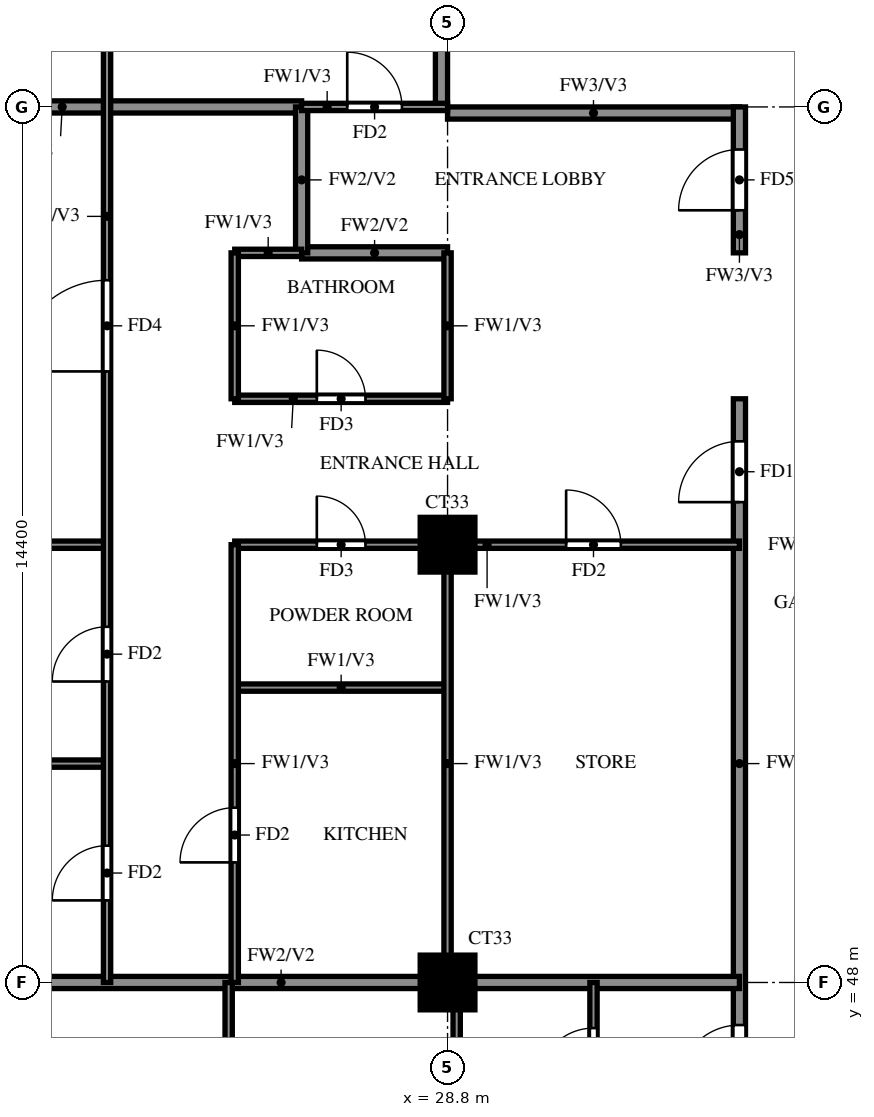
"""IFC4 building model, lengths in metres.
Left out: names, types, materials, properties, quantities, classifications, styles, units other than length and angle.
Written with IfcOpenShell. Run it as: python <this file> out.ifc"""

import sys

from ifc_helpers import new_model, si_unit, direction, frame, frame_2d, origin, origin_2d, place, context, subcontext, project, spatial, rectangle, extrude, source, transform, mapped, element, fill, save


model = new_model("IFC4")
c1 = context("Model", 3, precision=1e-05, world=origin(), true_north=direction((0.0, 1.0)))
c2 = subcontext(c1, "Body", "Model", "MODEL_VIEW")
j1 = project(units=[si_unit("LENGTHUNIT", "METRE"), si_unit("PLANEANGLEUNIT", "RADIAN")], contexts=[c1])
p1 = place(None, origin())
s1 = spatial("IfcSite", under=j1, at=p1, CompositionType="ELEMENT")
p2 = place(p1, origin())
s2 = spatial("IfcBuilding", under=s1, at=p2, CompositionType="ELEMENT")
p3 = place(p2, frame((0.0, 0.0, 225.5)))
s3 = spatial("IfcBuildingStorey", under=s2, at=p3, CompositionType="ELEMENT", Elevation=225.5)
m1 = source(origin(), c2, "Body", "SweptSolid", [
    extrude(rectangle(XDim=0.9, YDim=0.9, at=origin_2d()), origin(), (0.0, 0.0, 1.0), 3.22),
])
for number, where, z_axis, x_axis in (
    (1, (28.8, 48.0, 0.0), (0.0, 0.0, 1.0), (1.0, 0.0, 0.0)),
    (2, (28.8, 55.2, 0.0), (0.0, 0.0, 1.0), (1.0, 0.0, 0.0)),
):
    element("IfcColumn", number, at=place(p3, frame(where, z_axis=z_axis, x_axis=x_axis)), inside=s3, PredefinedType="COLUMN", context=c2, shape_type="MappedRepresentation", body=[
        mapped(m1, transform((0.0, 0.0, 0.0))),
    ])
p4 = place(p3, frame((28.8, 62.3, 0.0), z_axis=(0.0, 0.0, 1.0), x_axis=(1.0, 0.0, 0.0)))
e3 = element("IfcWall", 3, at=p4, inside=s3, PredefinedType="SOLIDWALL", context=c2, shape_type="SweptSolid", body=[
    extrude(rectangle(XDim=4.8, YDim=0.2, at=frame_2d((2.4, 0.0))), origin(), (0.0, 0.0, 1.0), 3.22),
])
p5 = place(p3, frame((28.7, 62.4, 0.0), z_axis=(0.0, 0.0, 1.0), x_axis=(0.0, 1.0, 0.0)))
e4 = element("IfcWall", 4, at=p5, inside=s3, PredefinedType="SOLIDWALL", context=c2, shape_type="SweptSolid", body=[
    extrude(rectangle(XDim=15.6, YDim=0.2, at=frame_2d((7.8, 0.0))), origin(), (0.0, 0.0, 1.0), 3.22),
])
p6 = place(p3, frame((33.6, 45.6, 0.0), z_axis=(0.0, 0.0, 1.0), x_axis=(0.0, 1.0, 0.0)))
e5 = element("IfcWall", 5, at=p6, inside=s3, PredefinedType="SOLIDWALL", context=c2, shape_type="SweptSolid", body=[
    extrude(rectangle(XDim=12.0, YDim=0.2, at=frame_2d((6.0, 0.0))), origin(), (0.0, 0.0, 1.0), 3.22),
])
p7 = place(p6, frame((0.7, 0.0, 0.0)))
e6 = element("IfcOpeningElement", 6, at=p7, cuts=e5, PredefinedType="OPENING", context=c2, shape_type="SweptSolid", body=[
    extrude(rectangle(XDim=1.0, YDim=2.1, at=frame_2d((0.5, 1.05))), frame((0.0, 0.11, 0.0), z_axis=(0.0, -1.0, 0.0), x_axis=(1.0, 0.0, 0.0)), (0.0, 0.0, 1.0), 0.22),
])
p8 = place(p6, frame((10.3, 0.0, 0.0)))
e7 = element("IfcOpeningElement", 7, at=p8, cuts=e5, PredefinedType="OPENING", context=c2, shape_type="SweptSolid", body=[
    extrude(rectangle(XDim=1.0, YDim=2.1, at=frame_2d((0.5, 1.05))), frame((0.0, 0.11, 0.0), z_axis=(0.0, -1.0, 0.0), x_axis=(1.0, 0.0, 0.0)), (0.0, 0.0, 1.0), 0.22),
])
p9 = place(p3, frame((33.6, 60.0, 0.0), z_axis=(0.0, 0.0, 1.0), x_axis=(0.0, 1.0, 0.0)))
e8 = element("IfcWall", 8, at=p9, inside=s3, PredefinedType="SOLIDWALL", context=c2, shape_type="SweptSolid", body=[
    extrude(rectangle(XDim=2.4, YDim=0.2, at=frame_2d((1.2, 0.0))), origin(), (0.0, 0.0, 1.0), 3.22),
])
p10 = place(p9, frame((0.7, 0.0, 0.0)))
e9 = element("IfcOpeningElement", 9, at=p10, cuts=e8, PredefinedType="OPENING", context=c2, shape_type="SweptSolid", body=[
    extrude(rectangle(XDim=1.0, YDim=2.1, at=frame_2d((0.5, 1.05))), frame((0.0, 0.11, 0.0), z_axis=(0.0, -1.0, 0.0), x_axis=(1.0, 0.0, 0.0)), (0.0, 0.0, 1.0), 0.22),
])
p11 = place(p3, frame((18.525, 48.0, 0.0), z_axis=(0.0, 0.0, 1.0), x_axis=(1.0, 0.0, 0.0)))
e10 = element("IfcWall", 10, at=p11, inside=s3, PredefinedType="SOLIDWALL", context=c2, shape_type="SweptSolid", body=[
    extrude(rectangle(XDim=15.075, YDim=0.2, at=frame_2d((7.538, 0.0))), origin(), (0.0, 0.0, 1.0), 3.22),
])
p12 = place(p3, frame((26.4, 60.0, 0.0), z_axis=(0.0, 0.0, 1.0), x_axis=(1.0, 0.0, 0.0)))
e11 = element("IfcWall", 11, at=p12, inside=s3, PredefinedType="SOLIDWALL", context=c2, shape_type="SweptSolid", body=[
    extrude(rectangle(XDim=2.4, YDim=0.2, at=frame_2d((1.2, 0.0))), origin(), (0.0, 0.0, 1.0), 3.22),
])
p13 = place(p3, frame((18.525, 62.4, 0.0), z_axis=(0.0, 0.0, 1.0), x_axis=(1.0, 0.0, 0.0)))
e12 = element("IfcWall", 12, at=p13, inside=s3, PredefinedType="SOLIDWALL", context=c2, shape_type="SweptSolid", body=[
    extrude(rectangle(XDim=7.875, YDim=0.2, at=frame_2d((3.938, 0.0))), origin(), (0.0, 0.0, 1.0), 3.22),
])
p14 = place(p3, frame((26.4, 60.0, 0.0), z_axis=(0.0, 0.0, 1.0), x_axis=(0.0, 1.0, 0.0)))
e13 = element("IfcWall", 13, at=p14, inside=s3, PredefinedType="SOLIDWALL", context=c2, shape_type="SweptSolid", body=[
    extrude(rectangle(XDim=2.4, YDim=0.2, at=frame_2d((1.2, 0.0))), origin(), (0.0, 0.0, 1.0), 3.22),
])
p15 = place(p3, frame((18.525, 51.6, 0.0), z_axis=(0.0, 0.0, 1.0), x_axis=(1.0, 0.0, 0.0)))
e14 = element("IfcWall", 14, at=p15, inside=s3, PredefinedType="PARTITIONING", context=c2, shape_type="SweptSolid", body=[
    extrude(rectangle(XDim=4.675, YDim=0.12, at=frame_2d((2.337, 0.0))), origin(), (0.0, 0.0, 1.0), 2.32),
])
p16 = place(p3, frame((25.3, 52.85, 0.0), z_axis=(0.0, 0.0, 1.0), x_axis=(1.0, 0.0, 0.0)))
e15 = element("IfcWall", 15, at=p16, inside=s3, PredefinedType="PARTITIONING", context=c2, shape_type="SweptSolid", body=[
    extrude(rectangle(XDim=3.5, YDim=0.12, at=frame_2d((1.75, 0.0))), origin(), (0.0, 0.0, 1.0), 3.22),
])
p17 = place(p3, frame((18.525, 55.2, 0.0), z_axis=(0.0, 0.0, 1.0), x_axis=(1.0, 0.0, 0.0)))
e16 = element("IfcWall", 16, at=p17, inside=s3, PredefinedType="PARTITIONING", context=c2, shape_type="SweptSolid", body=[
    extrude(rectangle(XDim=4.675, YDim=0.12, at=frame_2d((2.337, 0.0))), origin(), (0.0, 0.0, 1.0), 3.22),
])
p18 = place(p3, frame((25.3, 55.2, 0.0), z_axis=(0.0, 0.0, 1.0), x_axis=(1.0, 0.0, 0.0)))
e17 = element("IfcWall", 17, at=p18, inside=s3, PredefinedType="PARTITIONING", context=c2, shape_type="SweptSolid", body=[
    extrude(rectangle(XDim=8.3, YDim=0.12, at=frame_2d((4.15, 0.0))), origin(), (0.0, 0.0, 1.0), 3.22),
])
p19 = place(p18, frame((1.35, 0.0, 0.0)))
e18 = element("IfcOpeningElement", 18, at=p19, cuts=e17, PredefinedType="OPENING", context=c2, shape_type="SweptSolid", body=[
    extrude(rectangle(XDim=0.8, YDim=2.1, at=frame_2d((0.4, 1.05))), frame((0.0, 0.07, 0.0), z_axis=(0.0, -1.0, 0.0), x_axis=(1.0, 0.0, 0.0)), (0.0, 0.0, 1.0), 0.14),
])
p20 = place(p18, frame((5.45, 0.0, 0.0)))
e19 = element("IfcOpeningElement", 19, at=p20, cuts=e17, PredefinedType="OPENING", context=c2, shape_type="SweptSolid", body=[
    extrude(rectangle(XDim=0.9, YDim=2.1, at=frame_2d((0.45, 1.05))), frame((0.0, 0.07, 0.0), z_axis=(0.0, -1.0, 0.0), x_axis=(1.0, 0.0, 0.0)), (0.0, 0.0, 1.0), 0.14),
])
p21 = place(p3, frame((25.3, 57.6, 0.0), z_axis=(0.0, 0.0, 1.0), x_axis=(1.0, 0.0, 0.0)))
e20 = element("IfcWall", 20, at=p21, inside=s3, PredefinedType="PARTITIONING", context=c2, shape_type="SweptSolid", body=[
    extrude(rectangle(XDim=3.5, YDim=0.12, at=frame_2d((1.75, 0.0))), origin(), (0.0, 0.0, 1.0), 3.22),
])
p22 = place(p21, frame((1.35, 0.0, 0.0)))
e21 = element("IfcOpeningElement", 21, at=p22, cuts=e20, PredefinedType="OPENING", context=c2, shape_type="SweptSolid", body=[
    extrude(rectangle(XDim=0.8, YDim=2.1, at=frame_2d((0.4, 1.05))), frame((0.0, 0.07, 0.0), z_axis=(0.0, -1.0, 0.0), x_axis=(1.0, 0.0, 0.0)), (0.0, 0.0, 1.0), 0.14),
])
p23 = place(p3, frame((25.3, 60.0, 0.0), z_axis=(0.0, 0.0, 1.0), x_axis=(1.0, 0.0, 0.0)))
e22 = element("IfcWall", 22, at=p23, inside=s3, PredefinedType="PARTITIONING", context=c2, shape_type="SweptSolid", body=[
    extrude(rectangle(XDim=1.1, YDim=0.12, at=frame_2d((0.55, 0.0))), origin(), (0.0, 0.0, 1.0), 3.22),
])
p24 = place(p3, frame((26.4, 62.4, 0.0), z_axis=(0.0, 0.0, 1.0), x_axis=(1.0, 0.0, 0.0)))
e23 = element("IfcWall", 23, at=p24, inside=s3, PredefinedType="PARTITIONING", context=c2, shape_type="SweptSolid", body=[
    extrude(rectangle(XDim=2.4, YDim=0.12, at=frame_2d((1.2, 0.0))), origin(), (0.0, 0.0, 1.0), 3.22),
])
p25 = place(p24, frame((0.75, 0.0, 0.0)))
e24 = element("IfcOpeningElement", 24, at=p25, cuts=e23, PredefinedType="OPENING", context=c2, shape_type="SweptSolid", body=[
    extrude(rectangle(XDim=0.9, YDim=2.1, at=frame_2d((0.45, 1.05))), frame((0.0, 0.07, 0.0), z_axis=(0.0, -1.0, 0.0), x_axis=(1.0, 0.0, 0.0)), (0.0, 0.0, 1.0), 0.14),
])
p26 = place(p3, frame((23.2, 48.0, 0.0), z_axis=(0.0, 0.0, 1.0), x_axis=(0.0, 1.0, 0.0)))
e25 = element("IfcWall", 25, at=p26, inside=s3, PredefinedType="PARTITIONING", context=c2, shape_type="SweptSolid", body=[
    extrude(rectangle(XDim=25.2, YDim=0.12, at=frame_2d((12.6, 0.0))), origin(), (0.0, 0.0, 1.0), 3.22),
])
p27 = place(p26, frame((1.35, 0.0, 0.0)))
e26 = element("IfcOpeningElement", 26, at=p27, cuts=e25, PredefinedType="OPENING", context=c2, shape_type="SweptSolid", body=[
    extrude(rectangle(XDim=0.9, YDim=2.1, at=frame_2d((0.45, 1.05))), frame((0.0, 0.07, 0.0), z_axis=(0.0, -1.0, 0.0), x_axis=(1.0, 0.0, 0.0)), (0.0, 0.0, 1.0), 0.14),
])
p28 = place(p26, frame((4.95, 0.0, 0.0)))
e27 = element("IfcOpeningElement", 27, at=p28, cuts=e25, PredefinedType="OPENING", context=c2, shape_type="SweptSolid", body=[
    extrude(rectangle(XDim=0.9, YDim=2.1, at=frame_2d((0.45, 1.05))), frame((0.0, 0.07, 0.0), z_axis=(0.0, -1.0, 0.0), x_axis=(1.0, 0.0, 0.0)), (0.0, 0.0, 1.0), 0.14),
])
p29 = place(p26, frame((10.05, 0.0, 0.0)))
e28 = element("IfcOpeningElement", 28, at=p29, cuts=e25, PredefinedType="OPENING", context=c2, shape_type="SweptSolid", body=[
    extrude(rectangle(XDim=1.5, YDim=2.1, at=frame_2d((0.75, 1.05))), frame((0.0, 0.07, 0.0), z_axis=(0.0, -1.0, 0.0), x_axis=(1.0, 0.0, 0.0)), (0.0, 0.0, 1.0), 0.14),
])
p30 = place(p26, frame((15.75, 0.0, 0.0)))
e29 = element("IfcOpeningElement", 29, at=p30, cuts=e25, PredefinedType="OPENING", context=c2, shape_type="SweptSolid", body=[
    extrude(rectangle(XDim=0.9, YDim=2.1, at=frame_2d((0.45, 1.05))), frame((0.0, 0.07, 0.0), z_axis=(0.0, -1.0, 0.0), x_axis=(1.0, 0.0, 0.0)), (0.0, 0.0, 1.0), 0.14),
])
p31 = place(p26, frame((19.35, 0.0, 0.0)))
e30 = element("IfcOpeningElement", 30, at=p31, cuts=e25, PredefinedType="OPENING", context=c2, shape_type="SweptSolid", body=[
    extrude(rectangle(XDim=0.9, YDim=2.1, at=frame_2d((0.45, 1.05))), frame((0.0, 0.07, 0.0), z_axis=(0.0, -1.0, 0.0), x_axis=(1.0, 0.0, 0.0)), (0.0, 0.0, 1.0), 0.14),
])
p32 = place(p26, frame((22.95, 0.0, 0.0)))
e31 = element("IfcOpeningElement", 31, at=p32, cuts=e25, PredefinedType="OPENING", context=c2, shape_type="SweptSolid", body=[
    extrude(rectangle(XDim=0.9, YDim=2.1, at=frame_2d((0.45, 1.05))), frame((0.0, 0.07, 0.0), z_axis=(0.0, -1.0, 0.0), x_axis=(1.0, 0.0, 0.0)), (0.0, 0.0, 1.0), 0.14),
])
p33 = place(p3, frame((25.2, 39.725, 0.0), z_axis=(0.0, 0.0, 1.0), x_axis=(0.0, 1.0, 0.0)))
e32 = element("IfcWall", 32, at=p33, inside=s3, PredefinedType="PARTITIONING", context=c2, shape_type="SweptSolid", body=[
    extrude(rectangle(XDim=8.275, YDim=0.12, at=frame_2d((4.137, 0.0))), origin(), (0.0, 0.0, 1.0), 3.22),
])
p34 = place(p33, frame((4.525, 0.0, 0.0)))
e33 = element("IfcOpeningElement", 33, at=p34, cuts=e32, PredefinedType="OPENING", context=c2, shape_type="SweptSolid", body=[
    extrude(rectangle(XDim=0.9, YDim=2.1, at=frame_2d((0.45, 1.05))), frame((0.0, 0.07, 0.0), z_axis=(0.0, -1.0, 0.0), x_axis=(1.0, 0.0, 0.0)), (0.0, 0.0, 1.0), 0.14),
])
p35 = place(p3, frame((25.3, 48.0, 0.0), z_axis=(0.0, 0.0, 1.0), x_axis=(0.0, 1.0, 0.0)))
e34 = element("IfcWall", 34, at=p35, inside=s3, PredefinedType="PARTITIONING", context=c2, shape_type="SweptSolid", body=[
    extrude(rectangle(XDim=7.2, YDim=0.12, at=frame_2d((3.6, 0.0))), origin(), (0.0, 0.0, 1.0), 3.22),
])
p36 = place(p35, frame((1.975, 0.0, 0.0)))
e35 = element("IfcOpeningElement", 35, at=p36, cuts=e34, PredefinedType="OPENING", context=c2, shape_type="SweptSolid", body=[
    extrude(rectangle(XDim=0.9, YDim=2.1, at=frame_2d((0.45, 1.05))), frame((0.0, 0.07, 0.0), z_axis=(0.0, -1.0, 0.0), x_axis=(1.0, 0.0, 0.0)), (0.0, 0.0, 1.0), 0.14),
])
p37 = place(p3, frame((25.3, 57.6, 0.0), z_axis=(0.0, 0.0, 1.0), x_axis=(0.0, 1.0, 0.0)))
e36 = element("IfcWall", 36, at=p37, inside=s3, PredefinedType="PARTITIONING", context=c2, shape_type="SweptSolid", body=[
    extrude(rectangle(XDim=2.4, YDim=0.12, at=frame_2d((1.2, 0.0))), origin(), (0.0, 0.0, 1.0), 3.22),
])
p38 = place(p3, frame((28.8, 48.0, 0.0), z_axis=(0.0, 0.0, 1.0), x_axis=(0.0, 1.0, 0.0)))
e37 = element("IfcWall", 37, at=p38, inside=s3, PredefinedType="PARTITIONING", context=c2, shape_type="SweptSolid", body=[
    extrude(rectangle(XDim=7.2, YDim=0.12, at=frame_2d((3.6, 0.0))), origin(), (0.0, 0.0, 1.0), 3.22),
])
for number, where, z_axis, x_axis in (
    (38, (28.8, 57.6, 0.0), (0.0, 0.0, 1.0), (0.0, 1.0, 0.0)),
    (39, (28.95, 45.6, 0.0), (0.0, 0.0, 1.0), (0.0, 1.0, 0.0)),
):
    element("IfcWall", number, at=place(p3, frame(where, z_axis=z_axis, x_axis=x_axis)), inside=s3, PredefinedType="PARTITIONING", context=c2, shape_type="SweptSolid", body=[
        extrude(rectangle(XDim=2.4, YDim=0.12, at=frame_2d((1.2, 0.0))), origin(), (0.0, 0.0, 1.0), 3.22),
    ])
p39 = place(p3, frame((31.2, 45.6, 0.0), z_axis=(0.0, 0.0, 1.0), x_axis=(0.0, 1.0, 0.0)))
e40 = element("IfcWall", 40, at=p39, inside=s3, PredefinedType="PARTITIONING", context=c2, shape_type="SweptSolid", body=[
    extrude(rectangle(XDim=2.4, YDim=0.12, at=frame_2d((1.2, 0.0))), origin(), (0.0, 0.0, 1.0), 3.22),
])
p40 = place(p39, frame((0.75, 0.0, 0.0)))
e41 = element("IfcOpeningElement", 41, at=p40, cuts=e40, PredefinedType="OPENING", context=c2, shape_type="SweptSolid", body=[
    extrude(rectangle(XDim=0.9, YDim=2.1, at=frame_2d((0.45, 1.05))), frame((0.0, 0.07, 0.0), z_axis=(0.0, -1.0, 0.0), x_axis=(1.0, 0.0, 0.0)), (0.0, 0.0, 1.0), 0.14),
])
p41 = place(p7, origin())
e42 = element("IfcDoor", 42, at=p41, inside=s3, OperationType="SINGLE_SWING_RIGHT", PredefinedType="DOOR", context=c2, shape_type="SweptSolid", body=[
    extrude(rectangle(XDim=1.0, YDim=2.1, at=frame_2d((0.5, 1.05))), frame((0.0, 0.025, 0.0), z_axis=(0.0, -1.0, 0.0), x_axis=(1.0, 0.0, 0.0)), (0.0, 0.0, 1.0), 0.05),
])
fill(e6, e42)
p42 = place(p40, origin())
e43 = element("IfcDoor", 43, at=p42, inside=s3, OperationType="SINGLE_SWING_LEFT", PredefinedType="DOOR", context=c2, shape_type="SweptSolid", body=[
    extrude(rectangle(XDim=0.9, YDim=2.1, at=frame_2d((0.45, 1.05))), frame((0.0, 0.025, 0.0), z_axis=(0.0, -1.0, 0.0), x_axis=(1.0, 0.0, 0.0)), (0.0, 0.0, 1.0), 0.05),
])
fill(e41, e43)
p43 = place(p8, origin())
e44 = element("IfcDoor", 44, at=p43, inside=s3, OperationType="SINGLE_SWING_LEFT", PredefinedType="DOOR", context=c2, shape_type="SweptSolid", body=[
    extrude(rectangle(XDim=1.0, YDim=2.1, at=frame_2d((0.5, 1.05))), frame((0.0, 0.025, 0.0), z_axis=(0.0, -1.0, 0.0), x_axis=(1.0, 0.0, 0.0)), (0.0, 0.0, 1.0), 0.05),
])
fill(e7, e44)
p44 = place(p27, origin())
e45 = element("IfcDoor", 45, at=p44, inside=s3, OperationType="SINGLE_SWING_LEFT", PredefinedType="DOOR", context=c2, shape_type="SweptSolid", body=[
    extrude(rectangle(XDim=0.9, YDim=2.1, at=frame_2d((0.45, 1.05))), frame((0.0, 0.025, 0.0), z_axis=(0.0, -1.0, 0.0), x_axis=(1.0, 0.0, 0.0)), (0.0, 0.0, 1.0), 0.05),
])
fill(e26, e45)
p45 = place(p28, origin())
e46 = element("IfcDoor", 46, at=p45, inside=s3, OperationType="SINGLE_SWING_RIGHT", PredefinedType="DOOR", context=c2, shape_type="SweptSolid", body=[
    extrude(rectangle(XDim=0.9, YDim=2.1, at=frame_2d((0.45, 1.05))), frame((0.0, 0.025, 0.0), z_axis=(0.0, -1.0, 0.0), x_axis=(1.0, 0.0, 0.0)), (0.0, 0.0, 1.0), 0.05),
])
fill(e27, e46)
p46 = place(p29, origin())
e47 = element("IfcDoor", 47, at=p46, inside=s3, OperationType="SINGLE_SWING_LEFT", PredefinedType="DOOR", context=c2, shape_type="SweptSolid", body=[
    extrude(rectangle(XDim=1.5, YDim=2.1, at=frame_2d((0.75, 1.05))), frame((0.0, 0.025, 0.0), z_axis=(0.0, -1.0, 0.0), x_axis=(1.0, 0.0, 0.0)), (0.0, 0.0, 1.0), 0.05),
])
fill(e28, e47)
p47 = place(p36, origin())
e48 = element("IfcDoor", 48, at=p47, inside=s3, OperationType="SINGLE_SWING_LEFT", PredefinedType="DOOR", context=c2, shape_type="SweptSolid", body=[
    extrude(rectangle(XDim=0.9, YDim=2.1, at=frame_2d((0.45, 1.05))), frame((0.0, 0.025, 0.0), z_axis=(0.0, -1.0, 0.0), x_axis=(1.0, 0.0, 0.0)), (0.0, 0.0, 1.0), 0.05),
])
fill(e35, e48)
p48 = place(p19, origin())
e49 = element("IfcDoor", 49, at=p48, inside=s3, OperationType="SINGLE_SWING_RIGHT", PredefinedType="DOOR", context=c2, shape_type="SweptSolid", body=[
    extrude(rectangle(XDim=0.8, YDim=2.1, at=frame_2d((0.4, 1.05))), frame((0.0, 0.025, 0.0), z_axis=(0.0, -1.0, 0.0), x_axis=(1.0, 0.0, 0.0)), (0.0, 0.0, 1.0), 0.05),
])
fill(e18, e49)
p49 = place(p22, origin())
e50 = element("IfcDoor", 50, at=p49, inside=s3, OperationType="SINGLE_SWING_LEFT", PredefinedType="DOOR", context=c2, shape_type="SweptSolid", body=[
    extrude(rectangle(XDim=0.8, YDim=2.1, at=frame_2d((0.4, 1.05))), frame((0.0, 0.025, 0.0), z_axis=(0.0, -1.0, 0.0), x_axis=(1.0, 0.0, 0.0)), (0.0, 0.0, 1.0), 0.05),
])
fill(e21, e50)
p50 = place(p20, origin())
e51 = element("IfcDoor", 51, at=p50, inside=s3, OperationType="SINGLE_SWING_LEFT", PredefinedType="DOOR", context=c2, shape_type="SweptSolid", body=[
    extrude(rectangle(XDim=0.9, YDim=2.1, at=frame_2d((0.45, 1.05))), frame((0.0, 0.025, 0.0), z_axis=(0.0, -1.0, 0.0), x_axis=(1.0, 0.0, 0.0)), (0.0, 0.0, 1.0), 0.05),
])
fill(e19, e51)
p51 = place(p25, origin())
e52 = element("IfcDoor", 52, at=p51, inside=s3, OperationType="SINGLE_SWING_LEFT", PredefinedType="DOOR", context=c2, shape_type="SweptSolid", body=[
    extrude(rectangle(XDim=0.9, YDim=2.1, at=frame_2d((0.45, 1.05))), frame((0.0, 0.025, 0.0), z_axis=(0.0, -1.0, 0.0), x_axis=(1.0, 0.0, 0.0)), (0.0, 0.0, 1.0), 0.05),
])
fill(e24, e52)
p52 = place(p10, origin())
e53 = element("IfcDoor", 53, at=p52, inside=s3, OperationType="SINGLE_SWING_RIGHT", PredefinedType="DOOR", context=c2, shape_type="SweptSolid", body=[
    extrude(rectangle(XDim=1.0, YDim=2.1, at=frame_2d((0.5, 1.05))), frame((0.0, 0.025, 0.0), z_axis=(0.0, -1.0, 0.0), x_axis=(1.0, 0.0, 0.0)), (0.0, 0.0, 1.0), 0.05),
])
fill(e9, e53)
save(model, sys.argv[1])
